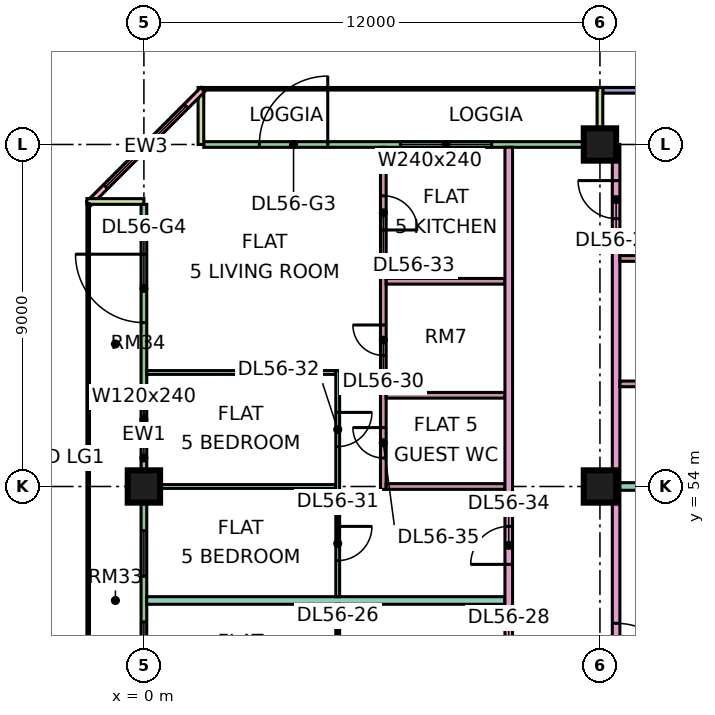
"""IFC4 building model, lengths in metres.
Left out: names, types, materials, properties, quantities, classifications, styles, units other than length and angle.
Written with IfcOpenShell. Run it as: python <this file> out.ifc"""

import sys

from ifc_helpers import new_model, si_unit, direction, frame, frame_2d, origin, origin_2d, place, context, subcontext, project, spatial, rectangle, extrude, element, fill, save


model = new_model("IFC4")
c1 = context("Model", 3, precision=1e-05, world=origin(), true_north=direction((0.0, 1.0)))
c2 = subcontext(c1, "Body", "Model", "MODEL_VIEW")
j1 = project(units=[si_unit("LENGTHUNIT", "METRE"), si_unit("PLANEANGLEUNIT", "RADIAN")], contexts=[c1])
p1 = place(None, origin())
s1 = spatial("IfcSite", under=j1, at=p1, CompositionType="ELEMENT")
p2 = place(p1, origin())
s2 = spatial("IfcBuilding", under=s1, at=p2, CompositionType="ELEMENT")
p3 = place(p2, frame((0.0, 0.0, 237.9)))
s3 = spatial("IfcBuildingStorey", under=s2, at=p3, CompositionType="ELEMENT", Elevation=237.9)
for number, where, z_axis, x_axis in (
    (1, (0.0, 54.0, 0.0), (0.0, 0.0, 1.0), (1.0, 0.0, 0.0)),
    (2, (12.0, 54.0, 0.0), (0.0, 0.0, 1.0), (1.0, 0.0, 0.0)),
    (3, (12.0, 63.0, 0.0), (0.0, 0.0, 1.0), (1.0, 0.0, 0.0)),
):
    element("IfcColumn", number, at=place(p3, frame(where, z_axis=z_axis, x_axis=x_axis)), inside=s3, PredefinedType="COLUMN", context=c2, shape_type="SweptSolid", body=[
        extrude(rectangle(XDim=0.85, YDim=0.85, at=origin_2d()), origin(), (0.0, 0.0, 1.0), 3.75),
    ])
p4 = place(p3, frame((22.5, 64.425, 0.0), z_axis=(0.0, 0.0, 1.0), x_axis=(-1.0, 0.0, 0.0)))
e4 = element("IfcWall", 4, at=p4, inside=s3, PredefinedType="SOLIDWALL", context=c2, shape_type="SweptSolid", body=[
    extrude(rectangle(XDim=10.425, YDim=0.15, at=frame_2d((5.212, 0.0))), origin(), (0.0, 0.0, 1.0), 3.35),
])
p5 = place(p4, frame((0.538, 0.0, 0.45)))
e5 = element("IfcOpeningElement", 5, at=p5, cuts=e4, PredefinedType="OPENING", context=c2, shape_type="SweptSolid", body=[
    extrude(rectangle(XDim=2.4, YDim=2.4, at=frame_2d((1.2, 1.2))), frame((0.0, 0.085, 0.0), z_axis=(0.0, -1.0, 0.0), x_axis=(1.0, 0.0, 0.0)), (0.0, 0.0, 1.0), 0.17),
])
p6 = place(p4, frame((5.275, 0.0, 0.45)))
e6 = element("IfcOpeningElement", 6, at=p6, cuts=e4, PredefinedType="OPENING", context=c2, shape_type="SweptSolid", body=[
    extrude(rectangle(XDim=3.0, YDim=2.4, at=frame_2d((1.5, 1.2))), frame((0.0, 0.085, 0.0), z_axis=(0.0, -1.0, 0.0), x_axis=(1.0, 0.0, 0.0)), (0.0, 0.0, 1.0), 0.17),
])
p7 = place(p3, frame((11.925, 63.0, 0.0), z_axis=(0.0, 0.0, 1.0), x_axis=(-1.0, 0.0, 0.0)))
e7 = element("IfcWall", 7, at=p7, inside=s3, PredefinedType="SOLIDWALL", context=c2, shape_type="SweptSolid", body=[
    extrude(rectangle(XDim=10.35, YDim=0.15, at=frame_2d((5.175, 0.0))), origin(), (0.0, 0.0, 1.0), 3.35),
])
p8 = place(p7, frame((2.775, 0.0, 0.45)))
e8 = element("IfcOpeningElement", 8, at=p8, cuts=e7, PredefinedType="OPENING", context=c2, shape_type="SweptSolid", body=[
    extrude(rectangle(XDim=2.4, YDim=2.4, at=frame_2d((1.2, 1.2))), frame((0.0, 0.085, 0.0), z_axis=(0.0, -1.0, 0.0), x_axis=(1.0, 0.0, 0.0)), (0.0, 0.0, 1.0), 0.17),
])
p9 = place(p7, frame((7.087, 0.0, 0.0)))
e9 = element("IfcOpeningElement", 9, at=p9, cuts=e7, PredefinedType="OPENING", context=c2, shape_type="SweptSolid", body=[
    extrude(rectangle(XDim=1.8, YDim=2.4, at=frame_2d((0.9, 1.2))), frame((0.0, 0.085, 0.0), z_axis=(0.0, -1.0, 0.0), x_axis=(1.0, 0.0, 0.0)), (0.0, 0.0, 1.0), 0.17),
])
for number, where, z_axis, x_axis in (
    (10, (12.0, 64.5, 0.0), (0.0, 0.0, 1.0), (0.0, -1.0, 0.0)),
    (11, (1.5, 64.5, 0.0), (0.0, 0.0, 1.0), (0.0, -1.0, 0.0)),
):
    element("IfcWall", number, at=place(p3, frame(where, z_axis=z_axis, x_axis=x_axis)), inside=s3, PredefinedType="SOLIDWALL", context=c2, shape_type="SweptSolid", body=[
        extrude(rectangle(XDim=1.5, YDim=0.15, at=frame_2d((0.75, 0.0))), origin(), (0.0, 0.0, 1.0), 3.35),
    ])
p10 = place(p3, frame((1.553, 64.447, 0.0), z_axis=(0.0, 0.0, 1.0), x_axis=(-0.707106781187, -0.707106781187, 0.0)))
e12 = element("IfcWall", 12, at=p10, inside=s3, PredefinedType="SOLIDWALL", context=c2, shape_type="SweptSolid", body=[
    extrude(rectangle(XDim=4.243, YDim=0.15, at=frame_2d((2.121, 0.0))), origin(), (0.0, 0.0, 1.0), 3.35),
])
p11 = place(p10, frame((0.621, 0.0, 0.45)))
e13 = element("IfcOpeningElement", 13, at=p11, cuts=e12, PredefinedType="OPENING", context=c2, shape_type="SweptSolid", body=[
    extrude(rectangle(XDim=3.0, YDim=2.4, at=frame_2d((1.5, 1.2))), frame((0.0, 0.085, 0.0), z_axis=(0.0, -1.0, 0.0), x_axis=(1.0, 0.0, 0.0)), (0.0, 0.0, 1.0), 0.17),
])
p12 = place(p3, frame((0.0, 61.425, 0.0), z_axis=(0.0, 0.0, 1.0), x_axis=(0.0, -1.0, 0.0)))
e14 = element("IfcWall", 14, at=p12, inside=s3, PredefinedType="SOLIDWALL", context=c2, shape_type="SweptSolid", body=[
    extrude(rectangle(XDim=13.35, YDim=0.15, at=frame_2d((6.675, 0.0))), origin(), (0.0, 0.0, 1.0), 3.35),
])
p13 = place(p12, frame((1.312, 0.0, 0.0)))
e15 = element("IfcOpeningElement", 15, at=p13, cuts=e14, PredefinedType="OPENING", context=c2, shape_type="SweptSolid", body=[
    extrude(rectangle(XDim=1.8, YDim=2.4, at=frame_2d((0.9, 1.2))), frame((0.0, 0.085, 0.0), z_axis=(0.0, -1.0, 0.0), x_axis=(1.0, 0.0, 0.0)), (0.0, 0.0, 1.0), 0.17),
])
p14 = place(p12, frame((5.062, 0.0, 0.45)))
e16 = element("IfcOpeningElement", 16, at=p14, cuts=e14, PredefinedType="OPENING", context=c2, shape_type="SweptSolid", body=[
    extrude(rectangle(XDim=1.2, YDim=2.4, at=frame_2d((0.6, 1.2))), frame((0.0, 0.085, 0.0), z_axis=(0.0, -1.0, 0.0), x_axis=(1.0, 0.0, 0.0)), (0.0, 0.0, 1.0), 0.17),
])
p15 = place(p12, frame((8.587, 0.0, 0.45)))
e17 = element("IfcOpeningElement", 17, at=p15, cuts=e14, PredefinedType="OPENING", context=c2, shape_type="SweptSolid", body=[
    extrude(rectangle(XDim=1.2, YDim=2.4, at=frame_2d((0.6, 1.2))), frame((0.0, 0.085, 0.0), z_axis=(0.0, -1.0, 0.0), x_axis=(1.0, 0.0, 0.0)), (0.0, 0.0, 1.0), 0.17),
])
p16 = place(p12, frame((10.988, 0.0, 0.45)))
e18 = element("IfcOpeningElement", 18, at=p16, cuts=e14, PredefinedType="OPENING", context=c2, shape_type="SweptSolid", body=[
    extrude(rectangle(XDim=1.8, YDim=2.4, at=frame_2d((0.9, 1.2))), frame((0.0, 0.085, 0.0), z_axis=(0.0, -1.0, 0.0), x_axis=(1.0, 0.0, 0.0)), (0.0, 0.0, 1.0), 0.17),
])
p17 = place(p3, frame((-1.5, 61.5, 0.0), z_axis=(0.0, 0.0, 1.0), x_axis=(1.0, 0.0, 0.0)))
e19 = element("IfcWall", 19, at=p17, inside=s3, PredefinedType="SOLIDWALL", context=c2, shape_type="SweptSolid", body=[
    extrude(rectangle(XDim=1.5, YDim=0.15, at=frame_2d((0.75, 0.0))), origin(), (0.0, 0.0, 1.0), 3.35),
])
p18 = place(p3, frame((0.074, 51.0, 0.0), z_axis=(0.0, 0.0, 1.0), x_axis=(1.0, 0.0, 0.0)))
e20 = element("IfcWall", 20, at=p18, inside=s3, PredefinedType="PARTITIONING", context=c2, shape_type="SweptSolid", body=[
    extrude(rectangle(XDim=9.426, YDim=0.2, at=frame_2d((4.713, 0.0))), origin(), (0.0, 0.0, 1.0), 3.35),
])
for number, where, z_axis, x_axis in (
    (21, (0.074, 54.0, 0.0), (0.0, 0.0, 1.0), (1.0, 0.0, 0.0)),
    (22, (0.074, 57.0, 0.0), (0.0, 0.0, 1.0), (1.0, 0.0, 0.0)),
):
    element("IfcWall", number, at=place(p3, frame(where, z_axis=z_axis, x_axis=x_axis)), inside=s3, PredefinedType="PARTITIONING", context=c2, shape_type="SweptSolid", body=[
        extrude(rectangle(XDim=4.976, YDim=0.1, at=frame_2d((2.488, 0.0))), origin(), (0.0, 0.0, 1.0), 3.35),
    ])
p19 = place(p3, frame((5.1, 44.95, 0.0), z_axis=(0.0, 0.0, 1.0), x_axis=(0.0, 1.0, 0.0)))
e23 = element("IfcWall", 23, at=p19, inside=s3, PredefinedType="PARTITIONING", context=c2, shape_type="SweptSolid", body=[
    extrude(rectangle(XDim=5.95, YDim=0.1, at=frame_2d((2.975, 0.0))), origin(), (0.0, 0.0, 1.0), 3.35),
])
p20 = place(p19, frame((1.1, 0.0, 0.0)))
e24 = element("IfcOpeningElement", 24, at=p20, cuts=e23, PredefinedType="OPENING", context=c2, shape_type="SweptSolid", body=[
    extrude(rectangle(XDim=0.9, YDim=2.1, at=frame_2d((0.45, 1.05))), frame((0.0, 0.06, 0.0), z_axis=(0.0, -1.0, 0.0), x_axis=(1.0, 0.0, 0.0)), (0.0, 0.0, 1.0), 0.12),
])
p21 = place(p19, frame((4.1, 0.0, 0.0)))
e25 = element("IfcOpeningElement", 25, at=p21, cuts=e23, PredefinedType="OPENING", context=c2, shape_type="SweptSolid", body=[
    extrude(rectangle(XDim=0.9, YDim=2.1, at=frame_2d((0.45, 1.05))), frame((0.0, 0.06, 0.0), z_axis=(0.0, -1.0, 0.0), x_axis=(1.0, 0.0, 0.0)), (0.0, 0.0, 1.0), 0.12),
])
p22 = place(p3, frame((5.1, 51.1, 0.0), z_axis=(0.0, 0.0, 1.0), x_axis=(0.0, 1.0, 0.0)))
e26 = element("IfcWall", 26, at=p22, inside=s3, PredefinedType="PARTITIONING", context=c2, shape_type="SweptSolid", body=[
    extrude(rectangle(XDim=5.95, YDim=0.1, at=frame_2d((2.975, 0.0))), origin(), (0.0, 0.0, 1.0), 3.35),
])
p23 = place(p22, frame((0.95, 0.0, 0.0)))
e27 = element("IfcOpeningElement", 27, at=p23, cuts=e26, PredefinedType="OPENING", context=c2, shape_type="SweptSolid", body=[
    extrude(rectangle(XDim=0.9, YDim=2.1, at=frame_2d((0.45, 1.05))), frame((0.0, 0.06, 0.0), z_axis=(0.0, -1.0, 0.0), x_axis=(1.0, 0.0, 0.0)), (0.0, 0.0, 1.0), 0.12),
])
p24 = place(p22, frame((3.95, 0.0, 0.0)))
e28 = element("IfcOpeningElement", 28, at=p24, cuts=e26, PredefinedType="OPENING", context=c2, shape_type="SweptSolid", body=[
    extrude(rectangle(XDim=0.9, YDim=2.1, at=frame_2d((0.45, 1.05))), frame((0.0, 0.06, 0.0), z_axis=(0.0, -1.0, 0.0), x_axis=(1.0, 0.0, 0.0)), (0.0, 0.0, 1.0), 0.12),
])
p25 = place(p3, frame((6.3, 53.925, 0.0), z_axis=(0.0, 0.0, 1.0), x_axis=(0.0, 1.0, 0.0)))
e29 = element("IfcWall", 29, at=p25, inside=s3, PredefinedType="PARTITIONING", context=c2, shape_type="SweptSolid", body=[
    extrude(rectangle(XDim=9.001, YDim=0.15, at=frame_2d((4.5, 0.0))), origin(), (0.0, 0.0, 1.0), 3.35),
])
p26 = place(p25, frame((3.525, 0.0, 0.0)))
e30 = element("IfcOpeningElement", 30, at=p26, cuts=e29, PredefinedType="OPENING", context=c2, shape_type="SweptSolid", body=[
    extrude(rectangle(XDim=0.8, YDim=2.1, at=frame_2d((0.4, 1.05))), frame((0.0, 0.085, 0.0), z_axis=(0.0, -1.0, 0.0), x_axis=(1.0, 0.0, 0.0)), (0.0, 0.0, 1.0), 0.17),
])
p27 = place(p25, frame((6.825, 0.0, 0.0)))
e31 = element("IfcOpeningElement", 31, at=p27, cuts=e29, PredefinedType="OPENING", context=c2, shape_type="SweptSolid", body=[
    extrude(rectangle(XDim=0.9, YDim=2.1, at=frame_2d((0.45, 1.05))), frame((0.0, 0.085, 0.0), z_axis=(0.0, -1.0, 0.0), x_axis=(1.0, 0.0, 0.0)), (0.0, 0.0, 1.0), 0.17),
])
p28 = place(p25, frame((0.825, 0.0, 0.0)))
e32 = element("IfcOpeningElement", 32, at=p28, cuts=e29, PredefinedType="OPENING", context=c2, shape_type="SweptSolid", body=[
    extrude(rectangle(XDim=0.8, YDim=2.1, at=frame_2d((0.4, 1.05))), frame((0.0, 0.085, 0.0), z_axis=(0.0, -1.0, 0.0), x_axis=(1.0, 0.0, 0.0)), (0.0, 0.0, 1.0), 0.17),
])
for number, where, z_axis, x_axis in (
    (33, (6.375, 54.0, 0.0), (0.0, 0.0, 1.0), (1.0, 0.0, 0.0)),
    (34, (6.375, 56.4, 0.0), (0.0, 0.0, 1.0), (1.0, 0.0, 0.0)),
    (35, (6.375, 59.4, 0.0), (0.0, 0.0, 1.0), (1.0, 0.0, 0.0)),
):
    element("IfcWall", number, at=place(p3, frame(where, z_axis=z_axis, x_axis=x_axis)), inside=s3, PredefinedType="PARTITIONING", context=c2, shape_type="SweptSolid", body=[
        extrude(rectangle(XDim=3.125, YDim=0.15, at=frame_2d((1.562, 0.0))), origin(), (0.0, 0.0, 1.0), 3.35),
    ])
p29 = place(p3, frame((9.6, 20.0, 0.0), z_axis=(0.0, 0.0, 1.0), x_axis=(0.0, 1.0, 0.0)))
e36 = element("IfcWall", 36, at=p29, inside=s3, PredefinedType="PARTITIONING", context=c2, shape_type="SweptSolid", body=[
    extrude(rectangle(XDim=42.926, YDim=0.2, at=frame_2d((21.463, 0.0))), origin(), (0.0, 0.0, 1.0), 3.35),
])
p30 = place(p29, frame((28.95, 0.0, 0.0)))
e37 = element("IfcOpeningElement", 37, at=p30, cuts=e36, PredefinedType="OPENING", context=c2, shape_type="SweptSolid", body=[
    extrude(rectangle(XDim=1.0, YDim=2.1, at=frame_2d((0.5, 1.05))), frame((0.0, 0.11, 0.0), z_axis=(0.0, -1.0, 0.0), x_axis=(1.0, 0.0, 0.0)), (0.0, 0.0, 1.0), 0.22),
])
p31 = place(p29, frame((31.95, 0.0, 0.0)))
e38 = element("IfcOpeningElement", 38, at=p31, cuts=e36, PredefinedType="OPENING", context=c2, shape_type="SweptSolid", body=[
    extrude(rectangle(XDim=1.0, YDim=2.1, at=frame_2d((0.5, 1.05))), frame((0.0, 0.11, 0.0), z_axis=(0.0, -1.0, 0.0), x_axis=(1.0, 0.0, 0.0)), (0.0, 0.0, 1.0), 0.22),
])
p32 = place(p29, frame((0.6, 0.0, 0.0)))
e39 = element("IfcOpeningElement", 39, at=p32, cuts=e36, PredefinedType="OPENING", context=c2, shape_type="SweptSolid", body=[
    extrude(rectangle(XDim=1.2, YDim=2.1, at=frame_2d((0.6, 1.05))), frame((0.0, 0.11, 0.0), z_axis=(0.0, -1.0, 0.0), x_axis=(1.0, 0.0, 0.0)), (0.0, 0.0, 1.0), 0.22),
])
p33 = place(p29, frame((11.25, 0.0, 0.0)))
e40 = element("IfcOpeningElement", 40, at=p33, cuts=e36, PredefinedType="OPENING", context=c2, shape_type="SweptSolid", body=[
    extrude(rectangle(XDim=1.0, YDim=2.1, at=frame_2d((0.5, 1.05))), frame((0.0, 0.11, 0.0), z_axis=(0.0, -1.0, 0.0), x_axis=(1.0, 0.0, 0.0)), (0.0, 0.0, 1.0), 0.22),
])
p34 = place(p3, frame((12.425, 20.0, 0.0), z_axis=(0.0, 0.0, 1.0), x_axis=(0.0, 1.0, 0.0)))
e41 = element("IfcWall", 41, at=p34, inside=s3, PredefinedType="PARTITIONING", context=c2, shape_type="SweptSolid", body=[
    extrude(rectangle(XDim=43.0, YDim=0.2, at=frame_2d((21.5, 0.0))), origin(), (0.0, 0.0, 1.0), 3.35),
])
p35 = place(p34, frame((5.95, 0.0, 0.0)))
e42 = element("IfcOpeningElement", 42, at=p35, cuts=e41, PredefinedType="OPENING", context=c2, shape_type="SweptSolid", body=[
    extrude(rectangle(XDim=1.0, YDim=2.1, at=frame_2d((0.5, 1.05))), frame((0.0, 0.11, 0.0), z_axis=(0.0, -1.0, 0.0), x_axis=(1.0, 0.0, 0.0)), (0.0, 0.0, 1.0), 0.22),
])
p36 = place(p34, frame((12.0, 0.0, 0.0)))
e43 = element("IfcOpeningElement", 43, at=p36, cuts=e41, PredefinedType="OPENING", context=c2, shape_type="SweptSolid", body=[
    extrude(rectangle(XDim=1.0, YDim=2.1, at=frame_2d((0.5, 1.05))), frame((0.0, 0.11, 0.0), z_axis=(0.0, -1.0, 0.0), x_axis=(1.0, 0.0, 0.0)), (0.0, 0.0, 1.0), 0.22),
])
p37 = place(p34, frame((16.9, 0.0, 0.0)))
e44 = element("IfcOpeningElement", 44, at=p37, cuts=e41, PredefinedType="OPENING", context=c2, shape_type="SweptSolid", body=[
    extrude(rectangle(XDim=1.0, YDim=2.1, at=frame_2d((0.5, 1.05))), frame((0.0, 0.11, 0.0), z_axis=(0.0, -1.0, 0.0), x_axis=(1.0, 0.0, 0.0)), (0.0, 0.0, 1.0), 0.22),
])
p38 = place(p34, frame((41.05, 0.0, 0.0)))
e45 = element("IfcOpeningElement", 45, at=p38, cuts=e41, PredefinedType="OPENING", context=c2, shape_type="SweptSolid", body=[
    extrude(rectangle(XDim=1.0, YDim=2.1, at=frame_2d((0.5, 1.05))), frame((0.0, 0.11, 0.0), z_axis=(0.0, -1.0, 0.0), x_axis=(1.0, 0.0, 0.0)), (0.0, 0.0, 1.0), 0.22),
])
p39 = place(p34, frame((1.15, 0.0, 0.0)))
e46 = element("IfcOpeningElement", 46, at=p39, cuts=e41, PredefinedType="OPENING", context=c2, shape_type="SweptSolid", body=[
    extrude(rectangle(XDim=1.8, YDim=2.1, at=frame_2d((0.9, 1.05))), frame((0.0, 0.11, 0.0), z_axis=(0.0, -1.0, 0.0), x_axis=(1.0, 0.0, 0.0)), (0.0, 0.0, 1.0), 0.22),
])
p40 = place(p34, frame((28.6, 0.0, 0.0)))
e47 = element("IfcOpeningElement", 47, at=p40, cuts=e41, PredefinedType="OPENING", context=c2, shape_type="SweptSolid", body=[
    extrude(rectangle(XDim=1.8, YDim=2.1, at=frame_2d((0.9, 1.05))), frame((0.0, 0.11, 0.0), z_axis=(0.0, -1.0, 0.0), x_axis=(1.0, 0.0, 0.0)), (0.0, 0.0, 1.0), 0.22),
])
p41 = place(p3, frame((12.525, 54.0, 0.0), z_axis=(0.0, 0.0, 1.0), x_axis=(1.0, 0.0, 0.0)))
e48 = element("IfcWall", 48, at=p41, inside=s3, PredefinedType="PARTITIONING", context=c2, shape_type="SweptSolid", body=[
    extrude(rectangle(XDim=11.401, YDim=0.2, at=frame_2d((5.701, 0.0))), origin(), (0.0, 0.0, 1.0), 3.35),
])
for number, where, z_axis, x_axis in (
    (49, (12.525, 56.7, 0.0), (0.0, 0.0, 1.0), (1.0, 0.0, 0.0)),
    (50, (12.525, 60.0, 0.0), (0.0, 0.0, 1.0), (1.0, 0.0, 0.0)),
):
    element("IfcWall", number, at=place(p3, frame(where, z_axis=z_axis, x_axis=x_axis)), inside=s3, PredefinedType="PARTITIONING", context=c2, shape_type="SweptSolid", body=[
        extrude(rectangle(XDim=5.225, YDim=0.15, at=frame_2d((2.613, 0.0))), origin(), (0.0, 0.0, 1.0), 3.35),
    ])
p42 = place(p8, origin())
e51 = element("IfcWindow", 51, at=p42, inside=s3, PartitioningType="SINGLE_PANEL", PredefinedType="WINDOW", context=c2, shape_type="SweptSolid", body=[
    extrude(rectangle(XDim=2.4, YDim=2.4, at=frame_2d((1.2, 1.2))), frame((0.0, 0.03, 0.0), z_axis=(0.0, -1.0, 0.0), x_axis=(1.0, 0.0, 0.0)), (0.0, 0.0, 1.0), 0.06),
])
fill(e8, e51)
p43 = place(p9, frame((1.8, 0.0, 0.0), z_axis=(0.0, 0.0, 1.0), x_axis=(-1.0, 0.0, 0.0)))
e52 = element("IfcDoor", 52, at=p43, inside=s3, OperationType="DOUBLE_DOOR_SINGLE_SWING", PredefinedType="DOOR", context=c2, shape_type="SweptSolid", body=[
    extrude(rectangle(XDim=1.8, YDim=2.4, at=frame_2d((0.9, 1.2))), frame((0.0, 0.025, 0.0), z_axis=(0.0, -1.0, 0.0), x_axis=(1.0, 0.0, 0.0)), (0.0, 0.0, 1.0), 0.05),
])
fill(e9, e52)
p44 = place(p11, origin())
e53 = element("IfcWindow", 53, at=p44, inside=s3, PartitioningType="SINGLE_PANEL", PredefinedType="WINDOW", context=c2, shape_type="SweptSolid", body=[
    extrude(rectangle(XDim=3.0, YDim=2.4, at=frame_2d((1.5, 1.2))), frame((0.0, 0.03, 0.0), z_axis=(0.0, -1.0, 0.0), x_axis=(1.0, 0.0, 0.0)), (0.0, 0.0, 1.0), 0.06),
])
fill(e13, e53)
p45 = place(p13, frame((1.8, 0.0, 0.0), z_axis=(0.0, 0.0, 1.0), x_axis=(-1.0, 0.0, 0.0)))
e54 = element("IfcDoor", 54, at=p45, inside=s3, OperationType="DOUBLE_DOOR_SINGLE_SWING", PredefinedType="DOOR", context=c2, shape_type="SweptSolid", body=[
    extrude(rectangle(XDim=1.8, YDim=2.4, at=frame_2d((0.9, 1.2))), frame((0.0, 0.025, 0.0), z_axis=(0.0, -1.0, 0.0), x_axis=(1.0, 0.0, 0.0)), (0.0, 0.0, 1.0), 0.05),
])
fill(e15, e54)
p46 = place(p14, origin())
e55 = element("IfcWindow", 55, at=p46, inside=s3, PartitioningType="SINGLE_PANEL", PredefinedType="WINDOW", context=c2, shape_type="SweptSolid", body=[
    extrude(rectangle(XDim=1.2, YDim=2.4, at=frame_2d((0.6, 1.2))), frame((0.0, 0.03, 0.0), z_axis=(0.0, -1.0, 0.0), x_axis=(1.0, 0.0, 0.0)), (0.0, 0.0, 1.0), 0.06),
])
fill(e16, e55)
p47 = place(p15, origin())
e56 = element("IfcWindow", 56, at=p47, inside=s3, PartitioningType="SINGLE_PANEL", PredefinedType="WINDOW", context=c2, shape_type="SweptSolid", body=[
    extrude(rectangle(XDim=1.2, YDim=2.4, at=frame_2d((0.6, 1.2))), frame((0.0, 0.03, 0.0), z_axis=(0.0, -1.0, 0.0), x_axis=(1.0, 0.0, 0.0)), (0.0, 0.0, 1.0), 0.06),
])
fill(e17, e56)
p48 = place(p16, origin())
e57 = element("IfcWindow", 57, at=p48, inside=s3, PartitioningType="SINGLE_PANEL", PredefinedType="WINDOW", context=c2, shape_type="SweptSolid", body=[
    extrude(rectangle(XDim=1.8, YDim=2.4, at=frame_2d((0.9, 1.2))), frame((0.0, 0.03, 0.0), z_axis=(0.0, -1.0, 0.0), x_axis=(1.0, 0.0, 0.0)), (0.0, 0.0, 1.0), 0.06),
])
fill(e18, e57)
p49 = place(p38, frame((1.0, 0.0, 0.0), z_axis=(0.0, 0.0, 1.0), x_axis=(-1.0, 0.0, 0.0)))
e58 = element("IfcDoor", 58, at=p49, inside=s3, OperationType="SINGLE_SWING_RIGHT", PredefinedType="DOOR", context=c2, shape_type="SweptSolid", body=[
    extrude(rectangle(XDim=1.0, YDim=2.1, at=frame_2d((0.5, 1.05))), frame((0.0, 0.025, 0.0), z_axis=(0.0, -1.0, 0.0), x_axis=(1.0, 0.0, 0.0)), (0.0, 0.0, 1.0), 0.05),
])
fill(e45, e58)
p50 = place(p26, frame((0.8, 0.0, 0.0), z_axis=(0.0, 0.0, 1.0), x_axis=(-1.0, 0.0, 0.0)))
e59 = element("IfcDoor", 59, at=p50, inside=s3, OperationType="SINGLE_SWING_RIGHT", PredefinedType="DOOR", context=c2, shape_type="SweptSolid", body=[
    extrude(rectangle(XDim=0.8, YDim=2.1, at=frame_2d((0.4, 1.05))), frame((0.0, 0.025, 0.0), z_axis=(0.0, -1.0, 0.0), x_axis=(1.0, 0.0, 0.0)), (0.0, 0.0, 1.0), 0.05),
])
fill(e30, e59)
p51 = place(p23, origin())
e60 = element("IfcDoor", 60, at=p51, inside=s3, OperationType="SINGLE_SWING_RIGHT", PredefinedType="DOOR", context=c2, shape_type="SweptSolid", body=[
    extrude(rectangle(XDim=0.9, YDim=2.1, at=frame_2d((0.45, 1.05))), frame((0.0, 0.025, 0.0), z_axis=(0.0, -1.0, 0.0), x_axis=(1.0, 0.0, 0.0)), (0.0, 0.0, 1.0), 0.05),
])
fill(e27, e60)
p52 = place(p24, origin())
e61 = element("IfcDoor", 61, at=p52, inside=s3, OperationType="SINGLE_SWING_RIGHT", PredefinedType="DOOR", context=c2, shape_type="SweptSolid", body=[
    extrude(rectangle(XDim=0.9, YDim=2.1, at=frame_2d((0.45, 1.05))), frame((0.0, 0.025, 0.0), z_axis=(0.0, -1.0, 0.0), x_axis=(1.0, 0.0, 0.0)), (0.0, 0.0, 1.0), 0.05),
])
fill(e28, e61)
p53 = place(p27, frame((0.9, 0.0, 0.0), z_axis=(0.0, 0.0, 1.0), x_axis=(-1.0, 0.0, 0.0)))
e62 = element("IfcDoor", 62, at=p53, inside=s3, OperationType="SINGLE_SWING_LEFT", PredefinedType="DOOR", context=c2, shape_type="SweptSolid", body=[
    extrude(rectangle(XDim=0.9, YDim=2.1, at=frame_2d((0.45, 1.05))), frame((0.0, 0.025, 0.0), z_axis=(0.0, -1.0, 0.0), x_axis=(1.0, 0.0, 0.0)), (0.0, 0.0, 1.0), 0.05),
])
fill(e31, e62)
p54 = place(p31, origin())
e63 = element("IfcDoor", 63, at=p54, inside=s3, OperationType="SINGLE_SWING_LEFT", PredefinedType="DOOR", context=c2, shape_type="SweptSolid", body=[
    extrude(rectangle(XDim=1.0, YDim=2.1, at=frame_2d((0.5, 1.05))), frame((0.0, 0.025, 0.0), z_axis=(0.0, -1.0, 0.0), x_axis=(1.0, 0.0, 0.0)), (0.0, 0.0, 1.0), 0.05),
])
fill(e38, e63)
p55 = place(p28, frame((0.8, 0.0, 0.0), z_axis=(0.0, 0.0, 1.0), x_axis=(-1.0, 0.0, 0.0)))
e64 = element("IfcDoor", 64, at=p55, inside=s3, OperationType="SINGLE_SWING_RIGHT", PredefinedType="DOOR", context=c2, shape_type="SweptSolid", body=[
    extrude(rectangle(XDim=0.8, YDim=2.1, at=frame_2d((0.4, 1.05))), frame((0.0, 0.025, 0.0), z_axis=(0.0, -1.0, 0.0), x_axis=(1.0, 0.0, 0.0)), (0.0, 0.0, 1.0), 0.05),
])
fill(e32, e64)
p56 = place(p40, frame((1.8, 0.0, 0.0), z_axis=(0.0, 0.0, 1.0), x_axis=(-1.0, 0.0, 0.0)))
e65 = element("IfcDoor", 65, at=p56, inside=s3, OperationType="DOUBLE_DOOR_SINGLE_SWING", PredefinedType="DOOR", context=c2, shape_type="SweptSolid", body=[
    extrude(rectangle(XDim=1.8, YDim=2.1, at=frame_2d((0.9, 1.05))), frame((0.0, 0.025, 0.0), z_axis=(0.0, -1.0, 0.0), x_axis=(1.0, 0.0, 0.0)), (0.0, 0.0, 1.0), 0.05),
])
fill(e47, e65)
save(model, sys.argv[1])
